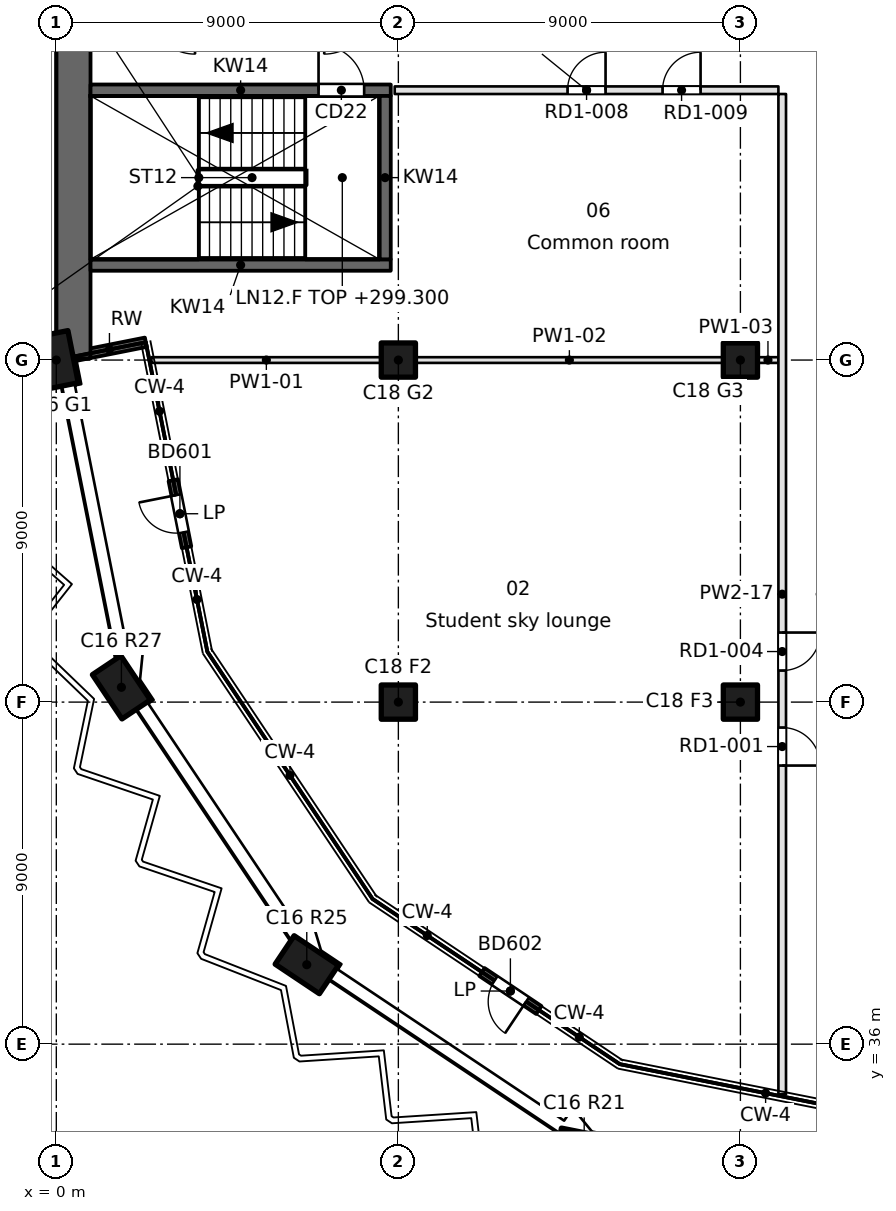
"""IFC4 building model, lengths in metres.
Left out: names, types, materials, properties, quantities, classifications, styles, units other than length and angle.
Written with IfcOpenShell. Run it as: python <this file> out.ifc"""

import sys

from ifc_helpers import new_model, si_unit, direction, frame, frame_2d, origin, origin_2d, place, context, subcontext, project, spatial, rectangle, extrude, element, fill, save


model = new_model("IFC4")
c1 = context("Model", 3, precision=1e-05, world=origin(), true_north=direction((0.0, 1.0)))
c2 = subcontext(c1, "Body", "Model", "MODEL_VIEW")
j1 = project(units=[si_unit("LENGTHUNIT", "METRE"), si_unit("PLANEANGLEUNIT", "RADIAN")], contexts=[c1])
p1 = place(None, origin())
s1 = spatial("IfcSite", under=j1, at=p1, CompositionType="ELEMENT")
p2 = place(p1, origin())
s2 = spatial("IfcBuilding", under=s1, at=p2, CompositionType="ELEMENT")
p3 = place(p2, frame((0.0, 0.0, 299.3)))
s3 = spatial("IfcBuildingStorey", under=s2, at=p3, CompositionType="ELEMENT", Elevation=299.3)
for number, where, z_axis, x_axis in (
    (1, (13.89, 33.213, 0.0), (0.0, 0.0, 1.0), (-0.981, 0.195, 0.0)),
    (2, (6.59, 38.09, 0.0), (0.0, 0.0, 1.0), (-0.831, 0.556, 0.0)),
    (3, (1.713, 45.39, 0.0), (0.0, 0.0, 1.0), (-0.556, 0.831, 0.0)),
    (4, (0.0, 54.0, 0.0), (0.0, 0.0, 1.0), (-0.195, 0.981, 0.0)),
):
    element("IfcColumn", number, at=place(p3, frame(where, z_axis=z_axis, x_axis=x_axis)), inside=s3, PredefinedType="COLUMN", context=c2, shape_type="SweptSolid", body=[
        extrude(rectangle(XDim=1.4, YDim=0.9, at=origin_2d()), origin(), (0.0, 0.0, 1.0), 3.45),
    ])
for number, where, z_axis, x_axis in (
    (5, (9.0, 45.0, 0.0), (0.0, 0.0, 1.0), (1.0, 0.0, 0.0)),
    (6, (9.0, 54.0, 0.0), (0.0, 0.0, 1.0), (1.0, 0.0, 0.0)),
    (7, (18.0, 45.0, 0.0), (0.0, 0.0, 1.0), (1.0, 0.0, 0.0)),
    (8, (18.0, 54.0, 0.0), (0.0, 0.0, 1.0), (1.0, 0.0, 0.0)),
):
    element("IfcColumn", number, at=place(p3, frame(where, z_axis=z_axis, x_axis=x_axis)), inside=s3, PredefinedType="COLUMN", context=c2, shape_type="SweptSolid", body=[
        extrude(rectangle(XDim=0.9, YDim=0.9, at=origin_2d()), origin(), (0.0, 0.0, 1.0), 3.7),
    ])
p4 = place(p3, frame((0.45, 94.5, 0.0), z_axis=(0.0, 0.0, 1.0), x_axis=(0.0, -1.0, 0.0)))
e9 = element("IfcWall", 9, at=p4, inside=s3, PredefinedType="SHEAR", context=c2, shape_type="SweptSolid", body=[
    extrude(rectangle(XDim=40.456, YDim=0.9, at=frame_2d((20.228, 0.0))), origin(), (0.0, 0.0, 1.0), 3.7),
])
p5 = place(p3, frame((0.441, 54.089, 0.0), z_axis=(0.0, 0.0, 1.0), x_axis=(0.980834936053, 0.194840519958, 0.0)))
e10 = element("IfcWall", 10, at=p5, inside=s3, PredefinedType="SOLIDWALL", context=c2, shape_type="SweptSolid", body=[
    extrude(rectangle(XDim=1.951, YDim=0.25, at=frame_2d((0.976, 0.0))), origin(), (0.0, 0.0, 1.0), 3.25),
])
p6 = place(p3, frame((3.077, 50.839, 0.0), z_axis=(0.0, 0.0, 1.0), x_axis=(0.195046569833, -0.980793982239, 0.0)))
e11 = element("IfcWall", 11, at=p6, inside=s3, PredefinedType="SOLIDWALL", context=c2, shape_type="SweptSolid", body=[
    extrude(rectangle(XDim=1.8, YDim=0.25, at=frame_2d((0.9, 0.0))), origin(), (0.0, 0.0, 1.0), 3.25),
])
p7 = place(p6, frame((0.4, 0.0, 0.0)))
e12 = element("IfcOpeningElement", 12, at=p7, cuts=e11, PredefinedType="OPENING", context=c2, shape_type="SweptSolid", body=[
    extrude(rectangle(XDim=1.0, YDim=2.1, at=frame_2d((0.5, 1.05))), frame((0.0, 0.125, 0.0), z_axis=(0.0, -1.0, 0.0), x_axis=(1.0, 0.0, 0.0)), (0.0, 0.0, 1.0), 0.25),
])
p8 = place(p3, frame((11.2, 37.898, 0.0), z_axis=(0.0, 0.0, 1.0), x_axis=(0.83146554274, -0.555576323502, 0.0)))
e13 = element("IfcWall", 13, at=p8, inside=s3, PredefinedType="SOLIDWALL", context=c2, shape_type="SweptSolid", body=[
    extrude(rectangle(XDim=1.8, YDim=0.25, at=frame_2d((0.9, 0.0))), origin(), (0.0, 0.0, 1.0), 3.25),
])
p9 = place(p8, frame((0.4, 0.0, 0.0)))
e14 = element("IfcOpeningElement", 14, at=p9, cuts=e13, PredefinedType="OPENING", context=c2, shape_type="SweptSolid", body=[
    extrude(rectangle(XDim=1.0, YDim=2.1, at=frame_2d((0.5, 1.05))), frame((0.0, 0.125, 0.0), z_axis=(0.0, -1.0, 0.0), x_axis=(1.0, 0.0, 0.0)), (0.0, 0.0, 1.0), 0.25),
])
p10 = place(p3, frame((0.9, 56.5, -0.4), z_axis=(0.0, 0.0, 1.0), x_axis=(1.0, 0.0, 0.0)))
e15 = element("IfcWall", 15, at=p10, inside=s3, PredefinedType="SOLIDWALL", context=c2, shape_type="SweptSolid", body=[
    extrude(rectangle(XDim=7.9, YDim=0.3, at=frame_2d((3.95, 0.0))), origin(), (0.0, 0.0, 1.0), 3.65),
])
p11 = place(p3, frame((0.9, 61.1, -0.4), z_axis=(0.0, 0.0, 1.0), x_axis=(1.0, 0.0, 0.0)))
e16 = element("IfcWall", 16, at=p11, inside=s3, PredefinedType="SOLIDWALL", context=c2, shape_type="SweptSolid", body=[
    extrude(rectangle(XDim=7.9, YDim=0.3, at=frame_2d((3.95, 0.0))), origin(), (0.0, 0.0, 1.0), 3.65),
])
p12 = place(p11, frame((6.0, 0.0, 0.4)))
e17 = element("IfcOpeningElement", 17, at=p12, cuts=e16, PredefinedType="OPENING", context=c2, shape_type="SweptSolid", body=[
    extrude(rectangle(XDim=1.2, YDim=2.1, at=frame_2d((0.6, 1.05))), frame((0.0, 0.15, 0.0), z_axis=(0.0, -1.0, 0.0), x_axis=(1.0, 0.0, 0.0)), (0.0, 0.0, 1.0), 0.3),
])
p13 = place(p3, frame((8.65, 56.65, -0.4), z_axis=(0.0, 0.0, 1.0), x_axis=(0.0, 1.0, 0.0)))
e18 = element("IfcWall", 18, at=p13, inside=s3, PredefinedType="SOLIDWALL", context=c2, shape_type="SweptSolid", body=[
    extrude(rectangle(XDim=4.3, YDim=0.3, at=frame_2d((2.15, 0.0))), origin(), (0.0, 0.0, 1.0), 3.65),
])
p14 = place(p3, frame((2.503, 54.0, 0.0), z_axis=(0.0, 0.0, 1.0), x_axis=(1.0, 0.0, 0.0)))
e19 = element("IfcWall", 19, at=p14, inside=s3, PredefinedType="PARTITIONING", context=c2, shape_type="SweptSolid", body=[
    extrude(rectangle(XDim=6.047, YDim=0.15, at=frame_2d((3.023, 0.0))), origin(), (0.0, 0.0, 1.0), 3.25),
])
p15 = place(p3, frame((9.45, 54.0, 0.0), z_axis=(0.0, 0.0, 1.0), x_axis=(1.0, 0.0, 0.0)))
e20 = element("IfcWall", 20, at=p15, inside=s3, PredefinedType="PARTITIONING", context=c2, shape_type="SweptSolid", body=[
    extrude(rectangle(XDim=8.1, YDim=0.15, at=frame_2d((4.05, 0.0))), origin(), (0.0, 0.0, 1.0), 3.25),
])
p16 = place(p3, frame((18.45, 54.0, 0.0), z_axis=(0.0, 0.0, 1.0), x_axis=(1.0, 0.0, 0.0)))
e21 = element("IfcWall", 21, at=p16, inside=s3, PredefinedType="PARTITIONING", context=c2, shape_type="SweptSolid", body=[
    extrude(rectangle(XDim=0.55, YDim=0.15, at=frame_2d((0.275, 0.0))), origin(), (0.0, 0.0, 1.0), 3.25),
])
p17 = place(p3, frame((19.0, 61.1, 0.0), z_axis=(0.0, 0.0, 1.0), x_axis=(-1.0, 0.0, 0.0)))
e22 = element("IfcWall", 22, at=p17, inside=s3, PredefinedType="PARTITIONING", context=c2, shape_type="SweptSolid", body=[
    extrude(rectangle(XDim=10.096, YDim=0.2, at=frame_2d((5.048, 0.0))), origin(), (0.0, 0.0, 1.0), 3.25),
])
p18 = place(p17, frame((4.548, 0.0, 0.0)))
e23 = element("IfcOpeningElement", 23, at=p18, cuts=e22, PredefinedType="OPENING", context=c2, shape_type="SweptSolid", body=[
    extrude(rectangle(XDim=1.0, YDim=2.1, at=frame_2d((0.5, 1.05))), frame((0.0, 0.1, 0.0), z_axis=(0.0, -1.0, 0.0), x_axis=(1.0, 0.0, 0.0)), (0.0, 0.0, 1.0), 0.2),
])
p19 = place(p17, frame((2.048, 0.0, 0.0)))
e24 = element("IfcOpeningElement", 24, at=p19, cuts=e22, PredefinedType="OPENING", context=c2, shape_type="SweptSolid", body=[
    extrude(rectangle(XDim=1.0, YDim=2.1, at=frame_2d((0.5, 1.05))), frame((0.0, 0.1, 0.0), z_axis=(0.0, -1.0, 0.0), x_axis=(1.0, 0.0, 0.0)), (0.0, 0.0, 1.0), 0.2),
])
p20 = place(p3, frame((19.1, 34.679, 0.0), z_axis=(0.0, 0.0, 1.0), x_axis=(0.0, 1.0, 0.0)))
e25 = element("IfcWall", 25, at=p20, inside=s3, PredefinedType="PARTITIONING", context=c2, shape_type="SweptSolid", body=[
    extrude(rectangle(XDim=26.321, YDim=0.2, at=frame_2d((13.16, 0.0))), origin(), (0.0, 0.0, 1.0), 3.25),
])
p21 = place(p20, frame((8.651, 0.0, 0.0)))
e26 = element("IfcOpeningElement", 26, at=p21, cuts=e25, PredefinedType="OPENING", context=c2, shape_type="SweptSolid", body=[
    extrude(rectangle(XDim=1.0, YDim=2.1, at=frame_2d((0.5, 1.05))), frame((0.0, 0.1, 0.0), z_axis=(0.0, -1.0, 0.0), x_axis=(1.0, 0.0, 0.0)), (0.0, 0.0, 1.0), 0.2),
])
p22 = place(p20, frame((11.151, 0.0, 0.0)))
e27 = element("IfcOpeningElement", 27, at=p22, cuts=e25, PredefinedType="OPENING", context=c2, shape_type="SweptSolid", body=[
    extrude(rectangle(XDim=1.0, YDim=2.1, at=frame_2d((0.5, 1.05))), frame((0.0, 0.1, 0.0), z_axis=(0.0, -1.0, 0.0), x_axis=(1.0, 0.0, 0.0)), (0.0, 0.0, 1.0), 0.2),
])
p23 = place(p7, frame((1.0, 0.0, 0.0), z_axis=(0.0, 0.0, 1.0), x_axis=(-1.0, 0.0, 0.0)))
e28 = element("IfcDoor", 28, at=p23, inside=s3, OperationType="SINGLE_SWING_RIGHT", PredefinedType="DOOR", context=c2, shape_type="SweptSolid", body=[
    extrude(rectangle(XDim=1.0, YDim=2.1, at=frame_2d((0.5, 1.05))), frame((0.0, 0.025, 0.0), z_axis=(0.0, -1.0, 0.0), x_axis=(1.0, 0.0, 0.0)), (0.0, 0.0, 1.0), 0.05),
])
fill(e12, e28)
p24 = place(p9, frame((1.0, 0.0, 0.0), z_axis=(0.0, 0.0, 1.0), x_axis=(-1.0, 0.0, 0.0)))
e29 = element("IfcDoor", 29, at=p24, inside=s3, OperationType="SINGLE_SWING_LEFT", PredefinedType="DOOR", context=c2, shape_type="SweptSolid", body=[
    extrude(rectangle(XDim=1.0, YDim=2.1, at=frame_2d((0.5, 1.05))), frame((0.0, 0.025, 0.0), z_axis=(0.0, -1.0, 0.0), x_axis=(1.0, 0.0, 0.0)), (0.0, 0.0, 1.0), 0.05),
])
fill(e14, e29)
p25 = place(p12, origin())
e30 = element("IfcDoor", 30, at=p25, inside=s3, OperationType="SINGLE_SWING_LEFT", PredefinedType="DOOR", context=c2, shape_type="SweptSolid", body=[
    extrude(rectangle(XDim=1.2, YDim=2.1, at=frame_2d((0.6, 1.05))), frame((0.0, 0.025, 0.0), z_axis=(0.0, -1.0, 0.0), x_axis=(1.0, 0.0, 0.0)), (0.0, 0.0, 1.0), 0.05),
])
fill(e17, e30)
p26 = place(p21, frame((1.0, 0.0, 0.0), z_axis=(0.0, 0.0, 1.0), x_axis=(-1.0, 0.0, 0.0)))
e31 = element("IfcDoor", 31, at=p26, inside=s3, OperationType="SINGLE_SWING_RIGHT", PredefinedType="DOOR", context=c2, shape_type="SweptSolid", body=[
    extrude(rectangle(XDim=1.0, YDim=2.1, at=frame_2d((0.5, 1.05))), frame((0.0, 0.025, 0.0), z_axis=(0.0, -1.0, 0.0), x_axis=(1.0, 0.0, 0.0)), (0.0, 0.0, 1.0), 0.05),
])
fill(e26, e31)
p27 = place(p22, frame((1.0, 0.0, 0.0), z_axis=(0.0, 0.0, 1.0), x_axis=(-1.0, 0.0, 0.0)))
e32 = element("IfcDoor", 32, at=p27, inside=s3, OperationType="SINGLE_SWING_LEFT", PredefinedType="DOOR", context=c2, shape_type="SweptSolid", body=[
    extrude(rectangle(XDim=1.0, YDim=2.1, at=frame_2d((0.5, 1.05))), frame((0.0, 0.025, 0.0), z_axis=(0.0, -1.0, 0.0), x_axis=(1.0, 0.0, 0.0)), (0.0, 0.0, 1.0), 0.05),
])
fill(e27, e32)
p28 = place(p18, frame((1.0, 0.0, 0.0), z_axis=(0.0, 0.0, 1.0), x_axis=(-1.0, 0.0, 0.0)))
e33 = element("IfcDoor", 33, at=p28, inside=s3, OperationType="SINGLE_SWING_RIGHT", PredefinedType="DOOR", context=c2, shape_type="SweptSolid", body=[
    extrude(rectangle(XDim=1.0, YDim=2.1, at=frame_2d((0.5, 1.05))), frame((0.0, 0.025, 0.0), z_axis=(0.0, -1.0, 0.0), x_axis=(1.0, 0.0, 0.0)), (0.0, 0.0, 1.0), 0.05),
])
fill(e23, e33)
p29 = place(p19, frame((1.0, 0.0, 0.0), z_axis=(0.0, 0.0, 1.0), x_axis=(-1.0, 0.0, 0.0)))
e34 = element("IfcDoor", 34, at=p29, inside=s3, OperationType="SINGLE_SWING_RIGHT", PredefinedType="DOOR", context=c2, shape_type="SweptSolid", body=[
    extrude(rectangle(XDim=1.0, YDim=2.1, at=frame_2d((0.5, 1.05))), frame((0.0, 0.025, 0.0), z_axis=(0.0, -1.0, 0.0), x_axis=(1.0, 0.0, 0.0)), (0.0, 0.0, 1.0), 0.05),
])
fill(e24, e34)
save(model, sys.argv[1])
